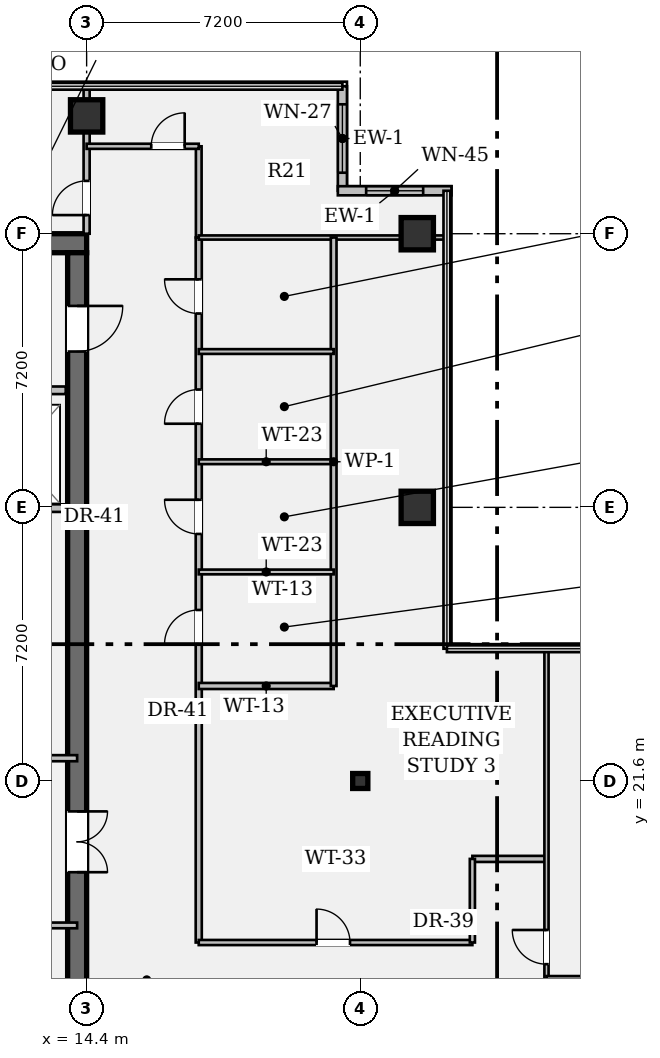
"""IFC4 building model, lengths in metres.
Left out: names, types, materials, properties, quantities, classifications, styles, units other than length and angle.
Written with IfcOpenShell. Run it as: python <this file> out.ifc"""

import sys

from ifc_helpers import new_model, si_unit, direction, frame, frame_2d, origin, origin_2d, place, context, subcontext, project, spatial, rectangle, hollow_rectangle, i_section, extrude, element, fill, save


model = new_model("IFC4")
c1 = context("Model", 3, precision=1e-05, world=origin(), true_north=direction((0.0, 1.0)))
c2 = subcontext(c1, "Body", "Model", "MODEL_VIEW")
j1 = project(units=[si_unit("LENGTHUNIT", "METRE"), si_unit("PLANEANGLEUNIT", "RADIAN")], contexts=[c1])
p1 = place(None, origin())
s1 = spatial("IfcSite", under=j1, at=p1, CompositionType="ELEMENT")
p2 = place(p1, origin())
s2 = spatial("IfcBuilding", under=s1, at=p2, CompositionType="ELEMENT")
p3 = place(p2, frame((0.0, 0.0, 183.75)))
s3 = spatial("IfcBuildingStorey", under=s2, at=p3, CompositionType="ELEMENT", Elevation=183.75)
p4 = place(p3, frame((0.5, 35.75, 0.0), z_axis=(0.0, 0.0, 1.0), x_axis=(1.0, 0.0, 0.0)))
e1 = element("IfcWall", 1, at=p4, inside=s3, PredefinedType="SHEAR", context=c2, shape_type="SweptSolid", body=[
    extrude(rectangle(XDim=13.9, YDim=0.5, at=frame_2d((6.95, 0.0))), origin(), (0.0, 0.0, 1.0), 3.24),
])
p5 = place(p3, frame((14.15, 35.5, 0.0), z_axis=(0.0, 0.0, 1.0), x_axis=(0.0, -1.0, 0.0)))
e2 = element("IfcWall", 2, at=p5, inside=s3, PredefinedType="SHEAR", context=c2, shape_type="SweptSolid", body=[
    extrude(rectangle(XDim=27.8, YDim=0.5, at=frame_2d((13.9, 0.0))), origin(), (0.0, 0.0, 1.0), 3.24),
])
p6 = place(p5, frame((1.4, 0.0, 0.0)))
e3 = element("IfcOpeningElement", 3, at=p6, cuts=e2, PredefinedType="OPENING", context=c2, shape_type="SweptSolid", body=[
    extrude(rectangle(XDim=1.2, YDim=2.15, at=frame_2d((0.6, 1.075))), frame((0.0, 0.262, 0.0), z_axis=(0.0, -1.0, 0.0), x_axis=(1.0, 0.0, 0.0)), (0.0, 0.0, 1.0), 0.524),
])
p7 = place(p5, frame((25.35, 0.0, 0.0)))
e4 = element("IfcOpeningElement", 4, at=p7, cuts=e2, PredefinedType="OPENING", context=c2, shape_type="SweptSolid", body=[
    extrude(rectangle(XDim=1.2, YDim=2.15, at=frame_2d((0.6, 1.075))), frame((0.0, 0.262, 0.0), z_axis=(0.0, -1.0, 0.0), x_axis=(1.0, 0.0, 0.0)), (0.0, 0.0, 1.0), 0.524),
])
p8 = place(p5, frame((14.7, 0.0, 0.0)))
e5 = element("IfcOpeningElement", 5, at=p8, cuts=e2, PredefinedType="OPENING", context=c2, shape_type="SweptSolid", body=[
    extrude(rectangle(XDim=1.6, YDim=2.2, at=frame_2d((0.8, 1.1))), frame((0.0, 0.262, 0.0), z_axis=(0.0, -1.0, 0.0), x_axis=(1.0, 0.0, 0.0)), (0.0, 0.0, 1.0), 0.524),
])
p9 = place(p3, frame((14.4, 39.1, 0.0), z_axis=(0.0, 0.0, 1.0), x_axis=(1.0, 0.0, 0.0)))
e6 = element("IfcColumn", 6, at=p9, inside=s3, PredefinedType="COLUMN", context=c2, shape_type="SweptSolid", body=[
    extrude(hollow_rectangle(XDim=0.85, YDim=0.85, WallThickness=0.05, at=origin_2d()), origin(), (0.0, 0.0, 1.0), 3.24),
])
p10 = place(p3, frame((21.6, 21.6, 0.0), z_axis=(0.0, 0.0, 1.0), x_axis=(1.0, 0.0, 0.0)))
e7 = element("IfcColumn", 7, at=p10, inside=s3, PredefinedType="COLUMN", context=c2, shape_type="SweptSolid", body=[
    extrude(i_section(OverallWidth=0.399, OverallDepth=0.394, WebThickness=0.023, FlangeThickness=0.037, FilletRadius=0.018, at=origin_2d()), origin(), (0.0, 0.0, 1.0), 3.24),
])
for number, where, z_axis, x_axis in (
    (8, (23.1, 28.8, 0.0), (0.0, 0.0, 1.0), (1.0, 0.0, 0.0)),
    (9, (23.1, 36.0, 0.0), (0.0, 0.0, 1.0), (1.0, 0.0, 0.0)),
):
    element("IfcColumn", number, at=place(p3, frame(where, z_axis=z_axis, x_axis=x_axis)), inside=s3, PredefinedType="COLUMN", context=c2, shape_type="SweptSolid", body=[
        extrude(hollow_rectangle(XDim=0.85, YDim=0.85, WallThickness=0.05, at=origin_2d()), origin(), (0.0, 0.0, 1.0), 3.24),
    ])
p11 = place(p3, frame((21.13, 39.88, 0.0), z_axis=(0.0, 0.0, 1.0), x_axis=(0.0, -1.0, 0.0)))
e10 = element("IfcWall", 10, at=p11, inside=s3, PredefinedType="STANDARD", context=c2, shape_type="SweptSolid", body=[
    extrude(rectangle(XDim=2.75, YDim=0.24, at=frame_2d((1.375, 0.0))), origin(), (0.0, 0.0, 1.0), 3.24),
])
p12 = place(p11, frame((0.475, 0.0, 0.95)))
e11 = element("IfcOpeningElement", 11, at=p12, cuts=e10, PredefinedType="OPENING", context=c2, shape_type="SweptSolid", body=[
    extrude(rectangle(XDim=1.8, YDim=1.35, at=frame_2d((0.9, 0.675))), frame((0.0, 0.132, 0.0), z_axis=(0.0, -1.0, 0.0), x_axis=(1.0, 0.0, 0.0)), (0.0, 0.0, 1.0), 0.264),
])
p13 = place(p3, frame((21.01, 37.13, 0.0), z_axis=(0.0, 0.0, 1.0), x_axis=(1.0, 0.0, 0.0)))
e12 = element("IfcWall", 12, at=p13, inside=s3, PredefinedType="STANDARD", context=c2, shape_type="SweptSolid", body=[
    extrude(rectangle(XDim=2.99, YDim=0.24, at=frame_2d((1.495, 0.0))), origin(), (0.0, 0.0, 1.0), 3.24),
])
p14 = place(p13, frame((0.745, 0.0, 0.95)))
e13 = element("IfcOpeningElement", 13, at=p14, cuts=e12, PredefinedType="OPENING", context=c2, shape_type="SweptSolid", body=[
    extrude(rectangle(XDim=1.5, YDim=1.8, at=frame_2d((0.75, 0.9))), frame((0.0, 0.132, 0.0), z_axis=(0.0, -1.0, 0.0), x_axis=(1.0, 0.0, 0.0)), (0.0, 0.0, 1.0), 0.264),
])
p15 = place(p3, frame((8.7, 31.88, 0.0), z_axis=(0.0, 0.0, 1.0), x_axis=(1.0, 0.0, 0.0)))
e14 = element("IfcWall", 14, at=p15, inside=s3, PredefinedType="PARTITIONING", context=c2, shape_type="SweptSolid", body=[
    extrude(rectangle(XDim=5.15, YDim=0.2, at=frame_2d((2.575, 0.0))), origin(), (0.0, 0.0, 1.0), 3.24),
])
p16 = place(p15, frame((0.75, 0.0, 0.0)))
e15 = element("IfcOpeningElement", 15, at=p16, cuts=e14, PredefinedType="OPENING", context=c2, shape_type="SweptSolid", body=[
    extrude(rectangle(XDim=1.2, YDim=2.2, at=frame_2d((0.6, 1.1))), frame((0.0, 0.112, 0.0), z_axis=(0.0, -1.0, 0.0), x_axis=(1.0, 0.0, 0.0)), (0.0, 0.0, 1.0), 0.224),
])
p17 = place(p15, frame((3.25, 0.0, 0.0)))
e16 = element("IfcOpeningElement", 16, at=p17, cuts=e14, PredefinedType="OPENING", context=c2, shape_type="SweptSolid", body=[
    extrude(rectangle(XDim=1.2, YDim=2.2, at=frame_2d((0.6, 1.1))), frame((0.0, 0.112, 0.0), z_axis=(0.0, -1.0, 0.0), x_axis=(1.0, 0.0, 0.0)), (0.0, 0.0, 1.0), 0.224),
])
p18 = place(p3, frame((8.7, 28.78, 0.0), z_axis=(0.0, 0.0, 1.0), x_axis=(1.0, 0.0, 0.0)))
e17 = element("IfcWall", 17, at=p18, inside=s3, PredefinedType="PARTITIONING", context=c2, shape_type="SweptSolid", body=[
    extrude(rectangle(XDim=5.15, YDim=0.2, at=frame_2d((2.575, 0.0))), origin(), (0.0, 0.0, 1.0), 3.24),
])
p19 = place(p3, frame((7.1, 22.2, 0.0), z_axis=(0.0, 0.0, 1.0), x_axis=(1.0, 0.0, 0.0)))
e18 = element("IfcWall", 18, at=p19, inside=s3, PredefinedType="PARTITIONING", context=c2, shape_type="SweptSolid", body=[
    extrude(rectangle(XDim=7.05, YDim=0.16, at=frame_2d((3.525, 0.0))), origin(), (0.0, 0.0, 1.0), 3.24),
])
p20 = place(p19, frame((2.4, 0.0, 0.0)))
e19 = element("IfcOpeningElement", 19, at=p20, cuts=e18, PredefinedType="OPENING", context=c2, shape_type="SweptSolid", body=[
    extrude(rectangle(XDim=1.0, YDim=2.15, at=frame_2d((0.5, 1.075))), frame((0.0, 0.092, 0.0), z_axis=(0.0, -1.0, 0.0), x_axis=(1.0, 0.0, 0.0)), (0.0, 0.0, 1.0), 0.184),
])
p21 = place(p3, frame((5.15, 17.8, 0.0), z_axis=(0.0, 0.0, 1.0), x_axis=(1.0, 0.0, 0.0)))
e20 = element("IfcWall", 20, at=p21, inside=s3, PredefinedType="PARTITIONING", context=c2, shape_type="SweptSolid", body=[
    extrude(rectangle(XDim=9.0, YDim=0.15, at=frame_2d((4.5, 0.0))), origin(), (0.0, 0.0, 1.0), 3.24),
])
p22 = place(p21, frame((2.65, 0.0, 0.0)))
e21 = element("IfcOpeningElement", 21, at=p22, cuts=e20, PredefinedType="OPENING", context=c2, shape_type="SweptSolid", body=[
    extrude(rectangle(XDim=0.9, YDim=2.15, at=frame_2d((0.45, 1.075))), frame((0.0, 0.087, 0.0), z_axis=(0.0, -1.0, 0.0), x_axis=(1.0, 0.0, 0.0)), (0.0, 0.0, 1.0), 0.174),
])
p23 = place(p21, frame((6.15, 0.0, 0.0)))
e22 = element("IfcOpeningElement", 22, at=p23, cuts=e20, PredefinedType="OPENING", context=c2, shape_type="SweptSolid", body=[
    extrude(rectangle(XDim=0.88, YDim=2.15, at=frame_2d((0.44, 1.075))), frame((0.0, 0.087, 0.0), z_axis=(0.0, -1.0, 0.0), x_axis=(1.0, 0.0, 0.0)), (0.0, 0.0, 1.0), 0.174),
])
p24 = place(p3, frame((17.35, 17.35, 0.0), z_axis=(0.0, 0.0, 1.0), x_axis=(0.0, 1.0, 0.0)))
e23 = element("IfcWall", 23, at=p24, inside=s3, PredefinedType="PARTITIONING", context=c2, shape_type="SweptSolid", body=[
    extrude(rectangle(XDim=18.55, YDim=0.16, at=frame_2d((9.275, 0.0))), origin(), (0.0, 0.0, 1.0), 2.603),
])
p25 = place(p24, frame((7.85, 0.0, 0.0)))
e24 = element("IfcOpeningElement", 24, at=p25, cuts=e23, PredefinedType="OPENING", context=c2, shape_type="SweptSolid", body=[
    extrude(rectangle(XDim=0.9, YDim=2.15, at=frame_2d((0.45, 1.075))), frame((0.0, 0.092, 0.0), z_axis=(0.0, -1.0, 0.0), x_axis=(1.0, 0.0, 0.0)), (0.0, 0.0, 1.0), 0.184),
])
p26 = place(p24, frame((10.75, 0.0, 0.0)))
e25 = element("IfcOpeningElement", 25, at=p26, cuts=e23, PredefinedType="OPENING", context=c2, shape_type="SweptSolid", body=[
    extrude(rectangle(XDim=0.9, YDim=2.15, at=frame_2d((0.45, 1.075))), frame((0.0, 0.092, 0.0), z_axis=(0.0, -1.0, 0.0), x_axis=(1.0, 0.0, 0.0)), (0.0, 0.0, 1.0), 0.184),
])
p27 = place(p24, frame((13.65, 0.0, 0.0)))
e26 = element("IfcOpeningElement", 26, at=p27, cuts=e23, PredefinedType="OPENING", context=c2, shape_type="SweptSolid", body=[
    extrude(rectangle(XDim=0.9, YDim=2.15, at=frame_2d((0.45, 1.075))), frame((0.0, 0.092, 0.0), z_axis=(0.0, -1.0, 0.0), x_axis=(1.0, 0.0, 0.0)), (0.0, 0.0, 1.0), 0.184),
])
p28 = place(p24, frame((16.55, 0.0, 0.0)))
e27 = element("IfcOpeningElement", 27, at=p28, cuts=e23, PredefinedType="OPENING", context=c2, shape_type="SweptSolid", body=[
    extrude(rectangle(XDim=0.9, YDim=2.15, at=frame_2d((0.45, 1.075))), frame((0.0, 0.092, 0.0), z_axis=(0.0, -1.0, 0.0), x_axis=(1.0, 0.0, 0.0)), (0.0, 0.0, 1.0), 0.184),
])
p29 = place(p3, frame((17.35, 17.35, 0.0), z_axis=(0.0, 0.0, 1.0), x_axis=(1.0, 0.0, 0.0)))
e28 = element("IfcWall", 28, at=p29, inside=s3, PredefinedType="PARTITIONING", context=c2, shape_type="SweptSolid", body=[
    extrude(rectangle(XDim=7.2, YDim=0.135, at=frame_2d((3.6, 0.0))), origin(), (0.0, 0.0, 1.0), 2.603),
])
p30 = place(p29, frame((3.1, 0.0, 0.0)))
e29 = element("IfcOpeningElement", 29, at=p30, cuts=e28, PredefinedType="OPENING", context=c2, shape_type="SweptSolid", body=[
    extrude(rectangle(XDim=0.88, YDim=2.15, at=frame_2d((0.44, 1.075))), frame((0.0, 0.08, 0.0), z_axis=(0.0, -1.0, 0.0), x_axis=(1.0, 0.0, 0.0)), (0.0, 0.0, 1.0), 0.159),
])
p31 = place(p3, frame((24.55, 19.55, 0.0), z_axis=(0.0, 0.0, 1.0), x_axis=(1.0, 0.0, 0.0)))
e30 = element("IfcWall", 30, at=p31, inside=s3, PredefinedType="PARTITIONING", context=c2, shape_type="SweptSolid", body=[
    extrude(rectangle(XDim=1.95, YDim=0.16, at=frame_2d((0.975, 0.0))), origin(), (0.0, 0.0, 1.0), 2.808),
])
p32 = place(p3, frame((24.55, 17.35, 0.0), z_axis=(0.0, 0.0, 1.0), x_axis=(0.0, 1.0, 0.0)))
e31 = element("IfcWall", 31, at=p32, inside=s3, PredefinedType="PARTITIONING", context=c2, shape_type="SweptSolid", body=[
    extrude(rectangle(XDim=2.2, YDim=0.135, at=frame_2d((1.1, 0.0))), origin(), (0.0, 0.0, 1.0), 3.24),
])
p33 = place(p3, frame((26.5, 3.32, 0.0), z_axis=(0.0, 0.0, 1.0), x_axis=(0.0, 1.0, 0.0)))
e32 = element("IfcWall", 32, at=p33, inside=s3, PredefinedType="PARTITIONING", context=c2, shape_type="SweptSolid", body=[
    extrude(rectangle(XDim=21.76, YDim=0.11, at=frame_2d((10.88, 0.0))), origin(), (0.0, 0.0, 1.0), 2.603),
])
p34 = place(p33, frame((11.79, 0.0, 0.0)))
e33 = element("IfcOpeningElement", 33, at=p34, cuts=e32, PredefinedType="OPENING", context=c2, shape_type="SweptSolid", body=[
    extrude(rectangle(XDim=0.9, YDim=2.15, at=frame_2d((0.45, 1.075))), frame((0.0, 0.067, 0.0), z_axis=(0.0, -1.0, 0.0), x_axis=(1.0, 0.0, 0.0)), (0.0, 0.0, 1.0), 0.134),
])
p35 = place(p33, frame((13.46, 0.0, 0.0)))
e34 = element("IfcOpeningElement", 34, at=p35, cuts=e32, PredefinedType="OPENING", context=c2, shape_type="SweptSolid", body=[
    extrude(rectangle(XDim=0.9, YDim=2.15, at=frame_2d((0.45, 1.075))), frame((0.0, 0.067, 0.0), z_axis=(0.0, -1.0, 0.0), x_axis=(1.0, 0.0, 0.0)), (0.0, 0.0, 1.0), 0.134),
])
p36 = place(p3, frame((14.4, 36.0, 0.0), z_axis=(0.0, 0.0, 1.0), x_axis=(0.0, 1.0, 0.0)))
e35 = element("IfcWall", 35, at=p36, inside=s3, PredefinedType="PARTITIONING", context=c2, shape_type="SweptSolid", body=[
    extrude(rectangle(XDim=3.88, YDim=0.16, at=frame_2d((1.94, 0.0))), origin(), (0.0, 0.0, 1.0), 2.603),
])
p37 = place(p36, frame((0.49, 0.0, 0.0)))
e36 = element("IfcOpeningElement", 36, at=p37, cuts=e35, PredefinedType="OPENING", context=c2, shape_type="SweptSolid", body=[
    extrude(rectangle(XDim=0.9, YDim=2.15, at=frame_2d((0.45, 1.075))), frame((0.0, 0.092, 0.0), z_axis=(0.0, -1.0, 0.0), x_axis=(1.0, 0.0, 0.0)), (0.0, 0.0, 1.0), 0.184),
])
p38 = place(p3, frame((17.35, 35.9, 0.0), z_axis=(0.0, 0.0, 1.0), x_axis=(0.0, 1.0, 0.0)))
e37 = element("IfcWall", 37, at=p38, inside=s3, PredefinedType="PARTITIONING", context=c2, shape_type="SweptSolid", body=[
    extrude(rectangle(XDim=2.4, YDim=0.15, at=frame_2d((1.2, 0.0))), origin(), (0.0, 0.0, 1.0), 2.603),
])
p39 = place(p3, frame((14.4, 38.3, 0.0), z_axis=(0.0, 0.0, 1.0), x_axis=(1.0, 0.0, 0.0)))
e38 = element("IfcWall", 38, at=p39, inside=s3, PredefinedType="PARTITIONING", context=c2, shape_type="SweptSolid", body=[
    extrude(rectangle(XDim=2.95, YDim=0.135, at=frame_2d((1.475, 0.0))), origin(), (0.0, 0.0, 1.0), 3.24),
])
p40 = place(p39, frame((1.7, 0.0, 0.0)))
e39 = element("IfcOpeningElement", 39, at=p40, cuts=e38, PredefinedType="OPENING", context=c2, shape_type="SweptSolid", body=[
    extrude(rectangle(XDim=0.88, YDim=2.15, at=frame_2d((0.44, 1.075))), frame((0.0, 0.08, 0.0), z_axis=(0.0, -1.0, 0.0), x_axis=(1.0, 0.0, 0.0)), (0.0, 0.0, 1.0), 0.159),
])
p41 = place(p3, frame((17.35, 35.9, 0.0), z_axis=(0.0, 0.0, 1.0), x_axis=(1.0, 0.0, 0.0)))
e40 = element("IfcWall", 40, at=p41, inside=s3, PredefinedType="PARTITIONING", context=c2, shape_type="SweptSolid", body=[
    extrude(rectangle(XDim=6.53, YDim=0.11, at=frame_2d((3.265, 0.0))), origin(), (0.0, 0.0, 1.0), 2.603),
])
p42 = place(p3, frame((17.35, 24.1, 0.0), z_axis=(0.0, 0.0, 1.0), x_axis=(1.0, 0.0, 0.0)))
e41 = element("IfcWall", 41, at=p42, inside=s3, PredefinedType="PARTITIONING", context=c2, shape_type="SweptSolid", body=[
    extrude(rectangle(XDim=3.55, YDim=0.16, at=frame_2d((1.775, 0.0))), origin(), (0.0, 0.0, 1.0), 2.808),
])
p43 = place(p3, frame((20.9, 24.1, 0.0), z_axis=(0.0, 0.0, 1.0), x_axis=(0.0, 1.0, 0.0)))
e42 = element("IfcWall", 42, at=p43, inside=s3, PredefinedType="PARTITIONING", context=c2, shape_type="SweptSolid", body=[
    extrude(rectangle(XDim=11.8, YDim=0.15, at=frame_2d((5.9, 0.0))), origin(), (0.0, 0.0, 1.0), 2.603),
])
for number, where, z_axis, x_axis in (
    (43, (17.35, 27.1, 0.0), (0.0, 0.0, 1.0), (1.0, 0.0, 0.0)),
    (44, (17.35, 30.0, 0.0), (0.0, 0.0, 1.0), (1.0, 0.0, 0.0)),
    (45, (17.35, 32.9, 0.0), (0.0, 0.0, 1.0), (1.0, 0.0, 0.0)),
):
    element("IfcWall", number, at=place(p3, frame(where, z_axis=z_axis, x_axis=x_axis)), inside=s3, PredefinedType="PARTITIONING", context=c2, shape_type="SweptSolid", body=[
        extrude(rectangle(XDim=3.55, YDim=0.125, at=frame_2d((1.775, 0.0))), origin(), (0.0, 0.0, 1.0), 2.808),
    ])
p44 = place(p3, frame((26.5, 16.4, 0.0), z_axis=(0.0, 0.0, 1.0), x_axis=(1.0, 0.0, 0.0)))
e46 = element("IfcWall", 46, at=p44, inside=s3, PredefinedType="PARTITIONING", context=c2, shape_type="SweptSolid", body=[
    extrude(rectangle(XDim=17.38, YDim=0.135, at=frame_2d((8.69, 0.0))), origin(), (0.0, 0.0, 1.0), 2.603),
])
p45 = place(p12, origin())
e47 = element("IfcWindow", 47, at=p45, inside=s3, PartitioningType="SINGLE_PANEL", PredefinedType="WINDOW", context=c2, shape_type="SweptSolid", body=[
    extrude(rectangle(XDim=1.8, YDim=1.35, at=frame_2d((0.9, 0.675))), frame((0.0, 0.03, 0.0), z_axis=(0.0, -1.0, 0.0), x_axis=(1.0, 0.0, 0.0)), (0.0, 0.0, 1.0), 0.06),
])
fill(e11, e47)
p46 = place(p14, origin())
e48 = element("IfcWindow", 48, at=p46, inside=s3, PartitioningType="SINGLE_PANEL", PredefinedType="WINDOW", context=c2, shape_type="SweptSolid", body=[
    extrude(rectangle(XDim=1.5, YDim=1.8, at=frame_2d((0.75, 0.9))), frame((0.0, 0.03, 0.0), z_axis=(0.0, -1.0, 0.0), x_axis=(1.0, 0.0, 0.0)), (0.0, 0.0, 1.0), 0.06),
])
fill(e13, e48)
p47 = place(p6, origin())
e49 = element("IfcDoor", 49, at=p47, inside=s3, OperationType="SINGLE_SWING_LEFT", PredefinedType="DOOR", context=c2, shape_type="SweptSolid", body=[
    extrude(rectangle(XDim=1.2, YDim=2.15, at=frame_2d((0.6, 1.075))), frame((0.0, 0.025, 0.0), z_axis=(0.0, -1.0, 0.0), x_axis=(1.0, 0.0, 0.0)), (0.0, 0.0, 1.0), 0.05),
])
fill(e3, e49)
p48 = place(p8, origin())
e50 = element("IfcDoor", 50, at=p48, inside=s3, OperationType="DOUBLE_DOOR_SINGLE_SWING", PredefinedType="DOOR", context=c2, shape_type="SweptSolid", body=[
    extrude(rectangle(XDim=1.6, YDim=2.2, at=frame_2d((0.8, 1.1))), frame((0.0, 0.025, 0.0), z_axis=(0.0, -1.0, 0.0), x_axis=(1.0, 0.0, 0.0)), (0.0, 0.0, 1.0), 0.05),
])
fill(e5, e50)
p49 = place(p37, origin())
e51 = element("IfcDoor", 51, at=p49, inside=s3, OperationType="SINGLE_SWING_LEFT", PredefinedType="DOOR", context=c2, shape_type="SweptSolid", body=[
    extrude(rectangle(XDim=0.9, YDim=2.15, at=frame_2d((0.45, 1.075))), frame((0.0, 0.025, 0.0), z_axis=(0.0, -1.0, 0.0), x_axis=(1.0, 0.0, 0.0)), (0.0, 0.0, 1.0), 0.05),
])
fill(e36, e51)
p50 = place(p40, origin())
e52 = element("IfcDoor", 52, at=p50, inside=s3, OperationType="SINGLE_SWING_RIGHT", PredefinedType="DOOR", context=c2, shape_type="SweptSolid", body=[
    extrude(rectangle(XDim=0.88, YDim=2.15, at=frame_2d((0.44, 1.075))), frame((0.0, 0.025, 0.0), z_axis=(0.0, -1.0, 0.0), x_axis=(1.0, 0.0, 0.0)), (0.0, 0.0, 1.0), 0.05),
])
fill(e39, e52)
p51 = place(p25, origin())
e53 = element("IfcDoor", 53, at=p51, inside=s3, OperationType="SINGLE_SWING_LEFT", PredefinedType="DOOR", context=c2, shape_type="SweptSolid", body=[
    extrude(rectangle(XDim=0.9, YDim=2.15, at=frame_2d((0.45, 1.075))), frame((0.0, 0.025, 0.0), z_axis=(0.0, -1.0, 0.0), x_axis=(1.0, 0.0, 0.0)), (0.0, 0.0, 1.0), 0.05),
])
fill(e24, e53)
p52 = place(p26, origin())
e54 = element("IfcDoor", 54, at=p52, inside=s3, OperationType="SINGLE_SWING_RIGHT", PredefinedType="DOOR", context=c2, shape_type="SweptSolid", body=[
    extrude(rectangle(XDim=0.9, YDim=2.15, at=frame_2d((0.45, 1.075))), frame((0.0, 0.025, 0.0), z_axis=(0.0, -1.0, 0.0), x_axis=(1.0, 0.0, 0.0)), (0.0, 0.0, 1.0), 0.05),
])
fill(e25, e54)
p53 = place(p27, origin())
e55 = element("IfcDoor", 55, at=p53, inside=s3, OperationType="SINGLE_SWING_LEFT", PredefinedType="DOOR", context=c2, shape_type="SweptSolid", body=[
    extrude(rectangle(XDim=0.9, YDim=2.15, at=frame_2d((0.45, 1.075))), frame((0.0, 0.025, 0.0), z_axis=(0.0, -1.0, 0.0), x_axis=(1.0, 0.0, 0.0)), (0.0, 0.0, 1.0), 0.05),
])
fill(e26, e55)
p54 = place(p28, origin())
e56 = element("IfcDoor", 56, at=p54, inside=s3, OperationType="SINGLE_SWING_RIGHT", PredefinedType="DOOR", context=c2, shape_type="SweptSolid", body=[
    extrude(rectangle(XDim=0.9, YDim=2.15, at=frame_2d((0.45, 1.075))), frame((0.0, 0.025, 0.0), z_axis=(0.0, -1.0, 0.0), x_axis=(1.0, 0.0, 0.0)), (0.0, 0.0, 1.0), 0.05),
])
fill(e27, e56)
p55 = place(p30, origin())
e57 = element("IfcDoor", 57, at=p55, inside=s3, OperationType="SINGLE_SWING_LEFT", PredefinedType="DOOR", context=c2, shape_type="SweptSolid", body=[
    extrude(rectangle(XDim=0.88, YDim=2.15, at=frame_2d((0.44, 1.075))), frame((0.0, 0.025, 0.0), z_axis=(0.0, -1.0, 0.0), x_axis=(1.0, 0.0, 0.0)), (0.0, 0.0, 1.0), 0.05),
])
fill(e29, e57)
p56 = place(p35, origin())
e58 = element("IfcDoor", 58, at=p56, inside=s3, OperationType="SINGLE_SWING_RIGHT", PredefinedType="DOOR", context=c2, shape_type="SweptSolid", body=[
    extrude(rectangle(XDim=0.9, YDim=2.15, at=frame_2d((0.45, 1.075))), frame((0.0, 0.025, 0.0), z_axis=(0.0, -1.0, 0.0), x_axis=(1.0, 0.0, 0.0)), (0.0, 0.0, 1.0), 0.05),
])
fill(e34, e58)
save(model, sys.argv[1])
